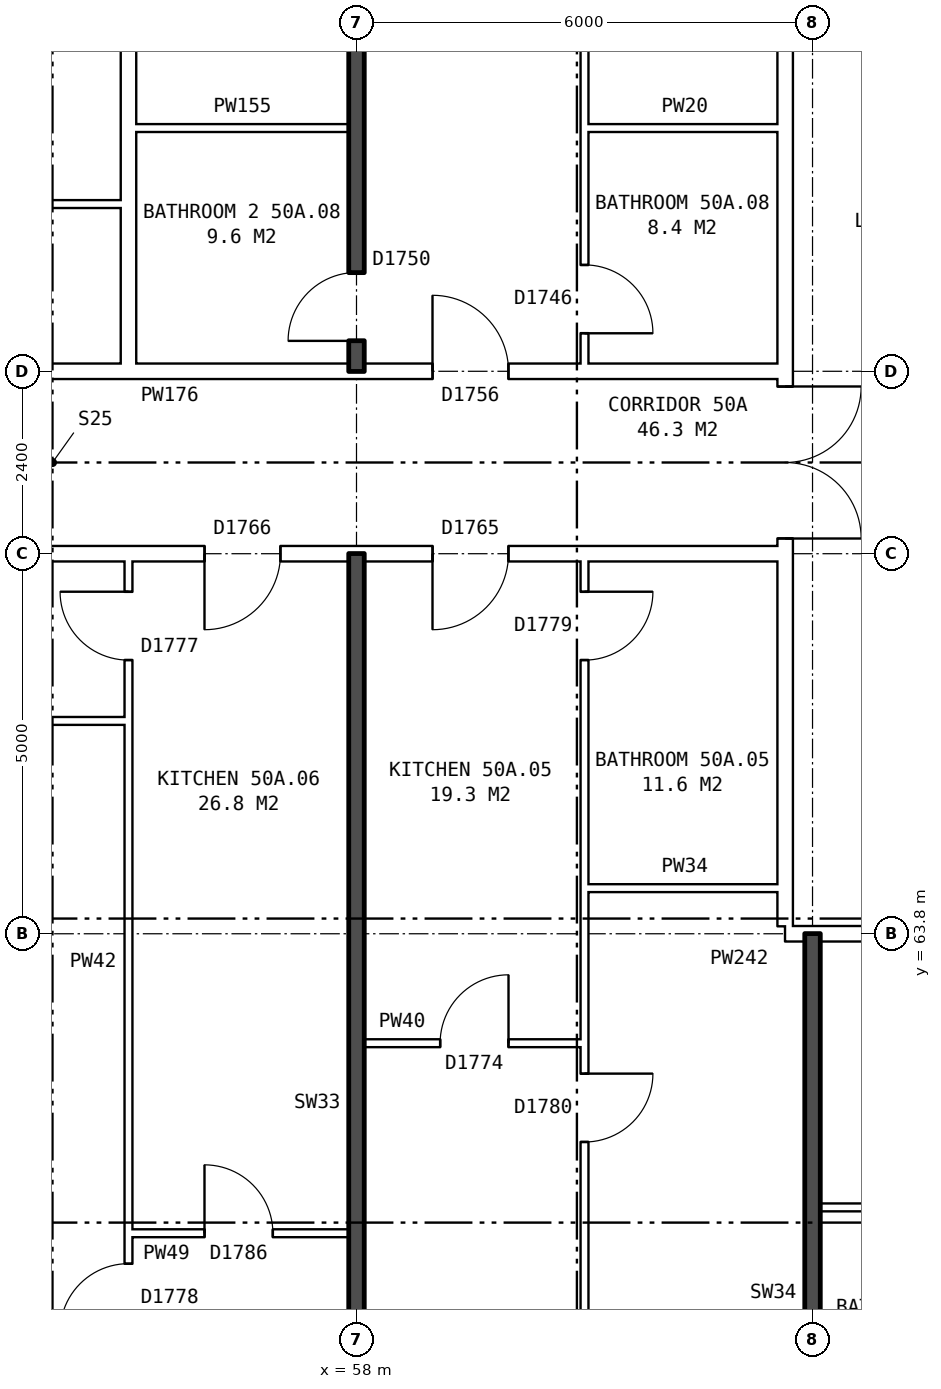
"""IFC4 building model, lengths in metres.
Left out: names, types, materials, properties, quantities, classifications, styles, units other than length and angle.
Written with IfcOpenShell. Run it as: python <this file> out.ifc"""

import sys

from ifc_helpers import new_model, si_unit, direction, frame, frame_2d, origin, place, context, subcontext, project, spatial, rectangle, extrude, element, fill, save


model = new_model("IFC4")
c1 = context("Model", 3, precision=1e-05, world=origin(), true_north=direction((0.0, 1.0)))
c2 = subcontext(c1, "Body", "Model", "MODEL_VIEW")
j1 = project(units=[si_unit("LENGTHUNIT", "METRE"), si_unit("PLANEANGLEUNIT", "RADIAN")], contexts=[c1])
p1 = place(None, origin())
s1 = spatial("IfcSite", under=j1, at=p1, CompositionType="ELEMENT")
p2 = place(p1, origin())
s2 = spatial("IfcBuilding", under=s1, at=p2, CompositionType="ELEMENT")
p3 = place(p2, frame((0.0, 0.0, 178.9)))
s3 = spatial("IfcBuildingStorey", under=s2, at=p3, CompositionType="ELEMENT", Elevation=178.9)
p4 = place(p3, frame((63.64, 63.9, 0.0), z_axis=(0.0, 0.0, 1.0), x_axis=(0.0, 1.0, 0.0)))
e1 = element("IfcWall", 1, at=p4, inside=s3, PredefinedType="PARTITIONING", context=c2, shape_type="SweptSolid", body=[
    extrude(rectangle(XDim=12.2, YDim=0.2, at=frame_2d((6.1, 0.0))), origin(), (0.0, 0.0, 1.0), 2.85),
])
p5 = place(p4, frame((5.1, 0.0, 0.0)))
e2 = element("IfcOpeningElement", 2, at=p5, cuts=e1, PredefinedType="OPENING", context=c2, shape_type="SweptSolid", body=[
    extrude(rectangle(XDim=2.0, YDim=2.1, at=frame_2d((1.0, 1.05))), frame((0.0, 0.11, 0.0), z_axis=(0.0, -1.0, 0.0), x_axis=(1.0, 0.0, 0.0)), (0.0, 0.0, 1.0), 0.22),
])
p6 = place(p3, frame((55.0, 59.86, 0.0), z_axis=(0.0, 0.0, 1.0), x_axis=(1.0, 0.0, 0.0)))
e3 = element("IfcWall", 3, at=p6, inside=s3, PredefinedType="PARTITIONING", context=c2, shape_type="SweptSolid", body=[
    extrude(rectangle(XDim=2.9, YDim=0.1, at=frame_2d((1.45, 0.0))), origin(), (0.0, 0.0, 1.0), 2.85),
])
p7 = place(p6, frame((1.0, 0.0, 0.0)))
e4 = element("IfcOpeningElement", 4, at=p7, cuts=e3, PredefinedType="OPENING", context=c2, shape_type="SweptSolid", body=[
    extrude(rectangle(XDim=0.9, YDim=2.1, at=frame_2d((0.45, 1.05))), frame((0.0, 0.06, 0.0), z_axis=(0.0, -1.0, 0.0), x_axis=(1.0, 0.0, 0.0)), (0.0, 0.0, 1.0), 0.12),
])
p8 = place(p3, frame((64.1, 60.2, 0.0), z_axis=(0.0, 0.0, 1.0), x_axis=(1.0, 0.0, 0.0)))
e5 = element("IfcWall", 5, at=p8, inside=s3, PredefinedType="PARTITIONING", context=c2, shape_type="SweptSolid", body=[
    extrude(rectangle(XDim=5.8, YDim=0.1, at=frame_2d((2.9, 0.0))), origin(), (0.0, 0.0, 1.0), 2.85),
])
p9 = place(p8, frame((3.6, 0.0, 0.0)))
e6 = element("IfcOpeningElement", 6, at=p9, cuts=e5, PredefinedType="OPENING", context=c2, shape_type="SweptSolid", body=[
    extrude(rectangle(XDim=0.9, YDim=2.1, at=frame_2d((0.45, 1.05))), frame((0.0, 0.06, 0.0), z_axis=(0.0, -1.0, 0.0), x_axis=(1.0, 0.0, 0.0)), (0.0, 0.0, 1.0), 0.12),
])
p10 = place(p8, frame((0.7, 0.0, 0.0)))
e7 = element("IfcOpeningElement", 7, at=p10, cuts=e5, PredefinedType="OPENING", context=c2, shape_type="SweptSolid", body=[
    extrude(rectangle(XDim=0.9, YDim=2.1, at=frame_2d((0.45, 1.05))), frame((0.0, 0.06, 0.0), z_axis=(0.0, -1.0, 0.0), x_axis=(1.0, 0.0, 0.0)), (0.0, 0.0, 1.0), 0.12),
])
p11 = place(p3, frame((58.1, 62.36, 0.0), z_axis=(0.0, 0.0, 1.0), x_axis=(1.0, 0.0, 0.0)))
e8 = element("IfcWall", 8, at=p11, inside=s3, PredefinedType="PARTITIONING", context=c2, shape_type="SweptSolid", body=[
    extrude(rectangle(XDim=2.9, YDim=0.1, at=frame_2d((1.45, 0.0))), origin(), (0.0, 0.0, 1.0), 2.85),
])
p12 = place(p11, frame((1.0, 0.0, 0.0)))
e9 = element("IfcOpeningElement", 9, at=p12, cuts=e8, PredefinedType="OPENING", context=c2, shape_type="SweptSolid", body=[
    extrude(rectangle(XDim=0.9, YDim=2.1, at=frame_2d((0.45, 1.05))), frame((0.0, 0.06, 0.0), z_axis=(0.0, -1.0, 0.0), x_axis=(1.0, 0.0, 0.0)), (0.0, 0.0, 1.0), 0.12),
])
p13 = place(p3, frame((63.64, 63.8, 0.0), z_axis=(0.0, 0.0, 1.0), x_axis=(1.0, 0.0, 0.0)))
e10 = element("IfcWall", 10, at=p13, inside=s3, PredefinedType="PARTITIONING", context=c2, shape_type="SweptSolid", body=[
    extrude(rectangle(XDim=3.0, YDim=0.2, at=frame_2d((1.5, 0.0))), origin(), (0.0, 0.0, 1.0), 2.85),
])
p14 = place(p13, frame((1.18, 0.0, 0.0)))
e11 = element("IfcOpeningElement", 11, at=p14, cuts=e10, PredefinedType="OPENING", context=c2, shape_type="SweptSolid", body=[
    extrude(rectangle(XDim=1.0, YDim=2.1, at=frame_2d((0.5, 1.05))), frame((0.0, 0.11, 0.0), z_axis=(0.0, -1.0, 0.0), x_axis=(1.0, 0.0, 0.0)), (0.0, 0.0, 1.0), 0.22),
])
p15 = place(p3, frame((61.0, 64.4, 0.0), z_axis=(0.0, 0.0, 1.0), x_axis=(1.0, 0.0, 0.0)))
e12 = element("IfcWall", 12, at=p15, inside=s3, PredefinedType="PARTITIONING", context=c2, shape_type="SweptSolid", body=[
    extrude(rectangle(XDim=2.64, YDim=0.1, at=frame_2d((1.32, 0.0))), origin(), (0.0, 0.0, 1.0), 2.85),
])
p16 = place(p3, frame((52.1, 66.6, 0.0), z_axis=(0.0, 0.0, 1.0), x_axis=(1.0, 0.0, 0.0)))
e13 = element("IfcWall", 13, at=p16, inside=s3, PredefinedType="PARTITIONING", context=c2, shape_type="SweptSolid", body=[
    extrude(rectangle(XDim=2.9, YDim=0.1, at=frame_2d((1.45, 0.0))), origin(), (0.0, 0.0, 1.0), 2.85),
])
p17 = place(p3, frame((44.36, 68.8, 0.0), z_axis=(0.0, 0.0, 1.0), x_axis=(1.0, 0.0, 0.0)))
e14 = element("IfcWall", 14, at=p17, inside=s3, PredefinedType="PARTITIONING", context=c2, shape_type="SweptSolid", body=[
    extrude(rectangle(XDim=19.28, YDim=0.2, at=frame_2d((9.64, 0.0))), origin(), (0.0, 0.0, 1.0), 2.85),
])
p18 = place(p17, frame((14.64, 0.0, 0.0)))
e15 = element("IfcOpeningElement", 15, at=p18, cuts=e14, PredefinedType="OPENING", context=c2, shape_type="SweptSolid", body=[
    extrude(rectangle(XDim=1.0, YDim=2.1, at=frame_2d((0.5, 1.05))), frame((0.0, 0.11, 0.0), z_axis=(0.0, -1.0, 0.0), x_axis=(1.0, 0.0, 0.0)), (0.0, 0.0, 1.0), 0.22),
])
p19 = place(p17, frame((11.64, 0.0, 0.0)))
e16 = element("IfcOpeningElement", 16, at=p19, cuts=e14, PredefinedType="OPENING", context=c2, shape_type="SweptSolid", body=[
    extrude(rectangle(XDim=1.0, YDim=2.1, at=frame_2d((0.5, 1.05))), frame((0.0, 0.11, 0.0), z_axis=(0.0, -1.0, 0.0), x_axis=(1.0, 0.0, 0.0)), (0.0, 0.0, 1.0), 0.22),
])
p20 = place(p17, frame((5.64, 0.0, 0.0)))
e17 = element("IfcOpeningElement", 17, at=p20, cuts=e14, PredefinedType="OPENING", context=c2, shape_type="SweptSolid", body=[
    extrude(rectangle(XDim=1.0, YDim=2.1, at=frame_2d((0.5, 1.05))), frame((0.0, 0.11, 0.0), z_axis=(0.0, -1.0, 0.0), x_axis=(1.0, 0.0, 0.0)), (0.0, 0.0, 1.0), 0.22),
])
p21 = place(p3, frame((44.36, 71.2, 0.0), z_axis=(0.0, 0.0, 1.0), x_axis=(1.0, 0.0, 0.0)))
e18 = element("IfcWall", 18, at=p21, inside=s3, PredefinedType="PARTITIONING", context=c2, shape_type="SweptSolid", body=[
    extrude(rectangle(XDim=19.28, YDim=0.2, at=frame_2d((9.64, 0.0))), origin(), (0.0, 0.0, 1.0), 2.85),
])
p22 = place(p21, frame((14.64, 0.0, 0.0)))
e19 = element("IfcOpeningElement", 19, at=p22, cuts=e18, PredefinedType="OPENING", context=c2, shape_type="SweptSolid", body=[
    extrude(rectangle(XDim=1.0, YDim=2.1, at=frame_2d((0.5, 1.05))), frame((0.0, 0.11, 0.0), z_axis=(0.0, -1.0, 0.0), x_axis=(1.0, 0.0, 0.0)), (0.0, 0.0, 1.0), 0.22),
])
p23 = place(p21, frame((5.64, 0.0, 0.0)))
e20 = element("IfcOpeningElement", 20, at=p23, cuts=e18, PredefinedType="OPENING", context=c2, shape_type="SweptSolid", body=[
    extrude(rectangle(XDim=1.0, YDim=2.1, at=frame_2d((0.5, 1.05))), frame((0.0, 0.11, 0.0), z_axis=(0.0, -1.0, 0.0), x_axis=(1.0, 0.0, 0.0)), (0.0, 0.0, 1.0), 0.22),
])
for number, where, z_axis, x_axis in (
    (21, (52.1, 73.4, 0.0), (0.0, 0.0, 1.0), (1.0, 0.0, 0.0)),
    (22, (55.1, 74.4, 0.0), (0.0, 0.0, 1.0), (1.0, 0.0, 0.0)),
):
    element("IfcWall", number, at=place(p3, frame(where, z_axis=z_axis, x_axis=x_axis)), inside=s3, PredefinedType="PARTITIONING", context=c2, shape_type="SweptSolid", body=[
        extrude(rectangle(XDim=2.8, YDim=0.1, at=frame_2d((1.4, 0.0))), origin(), (0.0, 0.0, 1.0), 2.85),
    ])
p24 = place(p3, frame((61.0, 74.4, 0.0), z_axis=(0.0, 0.0, 1.0), x_axis=(1.0, 0.0, 0.0)))
e23 = element("IfcWall", 23, at=p24, inside=s3, PredefinedType="PARTITIONING", context=c2, shape_type="SweptSolid", body=[
    extrude(rectangle(XDim=2.64, YDim=0.1, at=frame_2d((1.32, 0.0))), origin(), (0.0, 0.0, 1.0), 2.85),
])
p25 = place(p3, frame((55.0, 54.36, 0.0), z_axis=(0.0, 0.0, 1.0), x_axis=(0.0, 1.0, 0.0)))
e24 = element("IfcWall", 24, at=p25, inside=s3, PredefinedType="PARTITIONING", context=c2, shape_type="SweptSolid", body=[
    extrude(rectangle(XDim=14.34, YDim=0.1, at=frame_2d((7.17, 0.0))), origin(), (0.0, 0.0, 1.0), 2.85),
])
p26 = place(p25, frame((4.2, 0.0, 0.0)))
e25 = element("IfcOpeningElement", 25, at=p26, cuts=e24, PredefinedType="OPENING", context=c2, shape_type="SweptSolid", body=[
    extrude(rectangle(XDim=0.9, YDim=2.1, at=frame_2d((0.45, 1.05))), frame((0.0, 0.06, 0.0), z_axis=(0.0, -1.0, 0.0), x_axis=(1.0, 0.0, 0.0)), (0.0, 0.0, 1.0), 0.12),
])
p27 = place(p25, frame((13.04, 0.0, 0.0)))
e26 = element("IfcOpeningElement", 26, at=p27, cuts=e24, PredefinedType="OPENING", context=c2, shape_type="SweptSolid", body=[
    extrude(rectangle(XDim=0.9, YDim=2.1, at=frame_2d((0.45, 1.05))), frame((0.0, 0.06, 0.0), z_axis=(0.0, -1.0, 0.0), x_axis=(1.0, 0.0, 0.0)), (0.0, 0.0, 1.0), 0.12),
])
p28 = place(p3, frame((55.0, 71.3, 0.0), z_axis=(0.0, 0.0, 1.0), x_axis=(0.0, 1.0, 0.0)))
e27 = element("IfcWall", 27, at=p28, inside=s3, PredefinedType="PARTITIONING", context=c2, shape_type="SweptSolid", body=[
    extrude(rectangle(XDim=14.34, YDim=0.2, at=frame_2d((7.17, 0.0))), origin(), (0.0, 0.0, 1.0), 2.85),
])
p29 = place(p3, frame((58.0, 54.36, 0.0), z_axis=(0.0, 0.0, 1.0), x_axis=(0.0, 1.0, 0.0)))
e28 = element("IfcWall", 28, at=p29, inside=s3, PredefinedType="SOLIDWALL", context=c2, shape_type="SweptSolid", body=[
    extrude(rectangle(XDim=14.44, YDim=0.2, at=frame_2d((7.22, 0.0))), origin(), (0.0, 0.0, 1.0), 2.85),
])
p30 = place(p3, frame((58.0, 71.2, 0.0), z_axis=(0.0, 0.0, 1.0), x_axis=(0.0, 1.0, 0.0)))
e29 = element("IfcWall", 29, at=p30, inside=s3, PredefinedType="SOLIDWALL", context=c2, shape_type="SweptSolid", body=[
    extrude(rectangle(XDim=14.44, YDim=0.2, at=frame_2d((7.22, 0.0))), origin(), (0.0, 0.0, 1.0), 2.85),
])
p31 = place(p30, frame((9.34, 0.0, 0.0)))
e30 = element("IfcOpeningElement", 30, at=p31, cuts=e29, PredefinedType="OPENING", context=c2, shape_type="SweptSolid", body=[
    extrude(rectangle(XDim=0.9, YDim=2.1, at=frame_2d((0.45, 1.05))), frame((0.0, 0.11, 0.0), z_axis=(0.0, -1.0, 0.0), x_axis=(1.0, 0.0, 0.0)), (0.0, 0.0, 1.0), 0.22),
])
p32 = place(p30, frame((0.4, 0.0, 0.0)))
e31 = element("IfcOpeningElement", 31, at=p32, cuts=e29, PredefinedType="OPENING", context=c2, shape_type="SweptSolid", body=[
    extrude(rectangle(XDim=0.9, YDim=2.1, at=frame_2d((0.45, 1.05))), frame((0.0, 0.11, 0.0), z_axis=(0.0, -1.0, 0.0), x_axis=(1.0, 0.0, 0.0)), (0.0, 0.0, 1.0), 0.22),
])
p33 = place(p3, frame((61.0, 54.36, 0.0), z_axis=(0.0, 0.0, 1.0), x_axis=(0.0, 1.0, 0.0)))
e32 = element("IfcWall", 32, at=p33, inside=s3, PredefinedType="PARTITIONING", context=c2, shape_type="SweptSolid", body=[
    extrude(rectangle(XDim=14.34, YDim=0.1, at=frame_2d((7.17, 0.0))), origin(), (0.0, 0.0, 1.0), 2.85),
])
p34 = place(p33, frame((6.7, 0.0, 0.0)))
e33 = element("IfcOpeningElement", 33, at=p34, cuts=e32, PredefinedType="OPENING", context=c2, shape_type="SweptSolid", body=[
    extrude(rectangle(XDim=0.9, YDim=2.1, at=frame_2d((0.45, 1.05))), frame((0.0, 0.06, 0.0), z_axis=(0.0, -1.0, 0.0), x_axis=(1.0, 0.0, 0.0)), (0.0, 0.0, 1.0), 0.12),
])
p35 = place(p33, frame((13.04, 0.0, 0.0)))
e34 = element("IfcOpeningElement", 34, at=p35, cuts=e32, PredefinedType="OPENING", context=c2, shape_type="SweptSolid", body=[
    extrude(rectangle(XDim=0.9, YDim=2.1, at=frame_2d((0.45, 1.05))), frame((0.0, 0.06, 0.0), z_axis=(0.0, -1.0, 0.0), x_axis=(1.0, 0.0, 0.0)), (0.0, 0.0, 1.0), 0.12),
])
p36 = place(p3, frame((61.0, 71.3, 0.0), z_axis=(0.0, 0.0, 1.0), x_axis=(0.0, 1.0, 0.0)))
e35 = element("IfcWall", 35, at=p36, inside=s3, PredefinedType="PARTITIONING", context=c2, shape_type="SweptSolid", body=[
    extrude(rectangle(XDim=14.34, YDim=0.1, at=frame_2d((7.17, 0.0))), origin(), (0.0, 0.0, 1.0), 2.85),
])
p37 = place(p36, frame((9.24, 0.0, 0.0)))
e36 = element("IfcOpeningElement", 36, at=p37, cuts=e35, PredefinedType="OPENING", context=c2, shape_type="SweptSolid", body=[
    extrude(rectangle(XDim=0.9, YDim=2.1, at=frame_2d((0.45, 1.05))), frame((0.0, 0.06, 0.0), z_axis=(0.0, -1.0, 0.0), x_axis=(1.0, 0.0, 0.0)), (0.0, 0.0, 1.0), 0.12),
])
p38 = place(p36, frame((0.4, 0.0, 0.0)))
e37 = element("IfcOpeningElement", 37, at=p38, cuts=e35, PredefinedType="OPENING", context=c2, shape_type="SweptSolid", body=[
    extrude(rectangle(XDim=0.9, YDim=2.1, at=frame_2d((0.45, 1.05))), frame((0.0, 0.06, 0.0), z_axis=(0.0, -1.0, 0.0), x_axis=(1.0, 0.0, 0.0)), (0.0, 0.0, 1.0), 0.12),
])
p39 = place(p3, frame((64.0, 54.36, 0.0), z_axis=(0.0, 0.0, 1.0), x_axis=(0.0, 1.0, 0.0)))
e38 = element("IfcWall", 38, at=p39, inside=s3, PredefinedType="SOLIDWALL", context=c2, shape_type="SweptSolid", body=[
    extrude(rectangle(XDim=9.44, YDim=0.2, at=frame_2d((4.72, 0.0))), origin(), (0.0, 0.0, 1.0), 2.85),
])
p40 = place(p5, frame((2.0, 0.0, 0.0), z_axis=(0.0, 0.0, 1.0), x_axis=(-1.0, 0.0, 0.0)))
e39 = element("IfcDoor", 39, at=p40, inside=s3, OperationType="DOUBLE_DOOR_SINGLE_SWING", PredefinedType="DOOR", context=c2, shape_type="SweptSolid", body=[
    extrude(rectangle(XDim=2.0, YDim=2.1, at=frame_2d((1.0, 1.05))), frame((0.0, 0.025, 0.0), z_axis=(0.0, -1.0, 0.0), x_axis=(1.0, 0.0, 0.0)), (0.0, 0.0, 1.0), 0.05),
])
fill(e2, e39)
p41 = place(p34, frame((0.9, 0.0, 0.0), z_axis=(0.0, 0.0, 1.0), x_axis=(-1.0, 0.0, 0.0)))
e40 = element("IfcDoor", 40, at=p41, inside=s3, OperationType="SINGLE_SWING_LEFT", PredefinedType="DOOR", context=c2, shape_type="SweptSolid", body=[
    extrude(rectangle(XDim=0.9, YDim=2.1, at=frame_2d((0.45, 1.05))), frame((0.0, 0.025, 0.0), z_axis=(0.0, -1.0, 0.0), x_axis=(1.0, 0.0, 0.0)), (0.0, 0.0, 1.0), 0.05),
])
fill(e33, e40)
p42 = place(p18, frame((1.0, 0.0, 0.0), z_axis=(0.0, 0.0, 1.0), x_axis=(-1.0, 0.0, 0.0)))
e41 = element("IfcDoor", 41, at=p42, inside=s3, OperationType="SINGLE_SWING_RIGHT", PredefinedType="DOOR", context=c2, shape_type="SweptSolid", body=[
    extrude(rectangle(XDim=1.0, YDim=2.1, at=frame_2d((0.5, 1.05))), frame((0.0, 0.025, 0.0), z_axis=(0.0, -1.0, 0.0), x_axis=(1.0, 0.0, 0.0)), (0.0, 0.0, 1.0), 0.05),
])
fill(e15, e41)
p43 = place(p12, origin())
e42 = element("IfcDoor", 42, at=p43, inside=s3, OperationType="SINGLE_SWING_RIGHT", PredefinedType="DOOR", context=c2, shape_type="SweptSolid", body=[
    extrude(rectangle(XDim=0.9, YDim=2.1, at=frame_2d((0.45, 1.05))), frame((0.0, 0.025, 0.0), z_axis=(0.0, -1.0, 0.0), x_axis=(1.0, 0.0, 0.0)), (0.0, 0.0, 1.0), 0.05),
])
fill(e9, e42)
p44 = place(p35, frame((0.9, 0.0, 0.0), z_axis=(0.0, 0.0, 1.0), x_axis=(-1.0, 0.0, 0.0)))
e43 = element("IfcDoor", 43, at=p44, inside=s3, OperationType="SINGLE_SWING_LEFT", PredefinedType="DOOR", context=c2, shape_type="SweptSolid", body=[
    extrude(rectangle(XDim=0.9, YDim=2.1, at=frame_2d((0.45, 1.05))), frame((0.0, 0.025, 0.0), z_axis=(0.0, -1.0, 0.0), x_axis=(1.0, 0.0, 0.0)), (0.0, 0.0, 1.0), 0.05),
])
fill(e34, e43)
p45 = place(p26, origin())
e44 = element("IfcDoor", 44, at=p45, inside=s3, OperationType="SINGLE_SWING_LEFT", PredefinedType="DOOR", context=c2, shape_type="SweptSolid", body=[
    extrude(rectangle(XDim=0.9, YDim=2.1, at=frame_2d((0.45, 1.05))), frame((0.0, 0.025, 0.0), z_axis=(0.0, -1.0, 0.0), x_axis=(1.0, 0.0, 0.0)), (0.0, 0.0, 1.0), 0.05),
])
fill(e25, e44)
p46 = place(p19, frame((1.0, 0.0, 0.0), z_axis=(0.0, 0.0, 1.0), x_axis=(-1.0, 0.0, 0.0)))
e45 = element("IfcDoor", 45, at=p46, inside=s3, OperationType="SINGLE_SWING_RIGHT", PredefinedType="DOOR", context=c2, shape_type="SweptSolid", body=[
    extrude(rectangle(XDim=1.0, YDim=2.1, at=frame_2d((0.5, 1.05))), frame((0.0, 0.025, 0.0), z_axis=(0.0, -1.0, 0.0), x_axis=(1.0, 0.0, 0.0)), (0.0, 0.0, 1.0), 0.05),
])
fill(e16, e45)
p47 = place(p7, origin())
e46 = element("IfcDoor", 46, at=p47, inside=s3, OperationType="SINGLE_SWING_LEFT", PredefinedType="DOOR", context=c2, shape_type="SweptSolid", body=[
    extrude(rectangle(XDim=0.9, YDim=2.1, at=frame_2d((0.45, 1.05))), frame((0.0, 0.025, 0.0), z_axis=(0.0, -1.0, 0.0), x_axis=(1.0, 0.0, 0.0)), (0.0, 0.0, 1.0), 0.05),
])
fill(e4, e46)
p48 = place(p27, origin())
e47 = element("IfcDoor", 47, at=p48, inside=s3, OperationType="SINGLE_SWING_RIGHT", PredefinedType="DOOR", context=c2, shape_type="SweptSolid", body=[
    extrude(rectangle(XDim=0.9, YDim=2.1, at=frame_2d((0.45, 1.05))), frame((0.0, 0.025, 0.0), z_axis=(0.0, -1.0, 0.0), x_axis=(1.0, 0.0, 0.0)), (0.0, 0.0, 1.0), 0.05),
])
fill(e26, e47)
p49 = place(p22, origin())
e48 = element("IfcDoor", 48, at=p49, inside=s3, OperationType="SINGLE_SWING_LEFT", PredefinedType="DOOR", context=c2, shape_type="SweptSolid", body=[
    extrude(rectangle(XDim=1.0, YDim=2.1, at=frame_2d((0.5, 1.05))), frame((0.0, 0.025, 0.0), z_axis=(0.0, -1.0, 0.0), x_axis=(1.0, 0.0, 0.0)), (0.0, 0.0, 1.0), 0.05),
])
fill(e19, e48)
p50 = place(p38, frame((0.9, 0.0, 0.0), z_axis=(0.0, 0.0, 1.0), x_axis=(-1.0, 0.0, 0.0)))
e49 = element("IfcDoor", 49, at=p50, inside=s3, OperationType="SINGLE_SWING_RIGHT", PredefinedType="DOOR", context=c2, shape_type="SweptSolid", body=[
    extrude(rectangle(XDim=0.9, YDim=2.1, at=frame_2d((0.45, 1.05))), frame((0.0, 0.025, 0.0), z_axis=(0.0, -1.0, 0.0), x_axis=(1.0, 0.0, 0.0)), (0.0, 0.0, 1.0), 0.05),
])
fill(e37, e49)
p51 = place(p32, origin())
e50 = element("IfcDoor", 50, at=p51, inside=s3, OperationType="SINGLE_SWING_LEFT", PredefinedType="DOOR", context=c2, shape_type="SweptSolid", body=[
    extrude(rectangle(XDim=0.9, YDim=2.1, at=frame_2d((0.45, 1.05))), frame((0.0, 0.025, 0.0), z_axis=(0.0, -1.0, 0.0), x_axis=(1.0, 0.0, 0.0)), (0.0, 0.0, 1.0), 0.05),
])
fill(e31, e50)
save(model, sys.argv[1])
